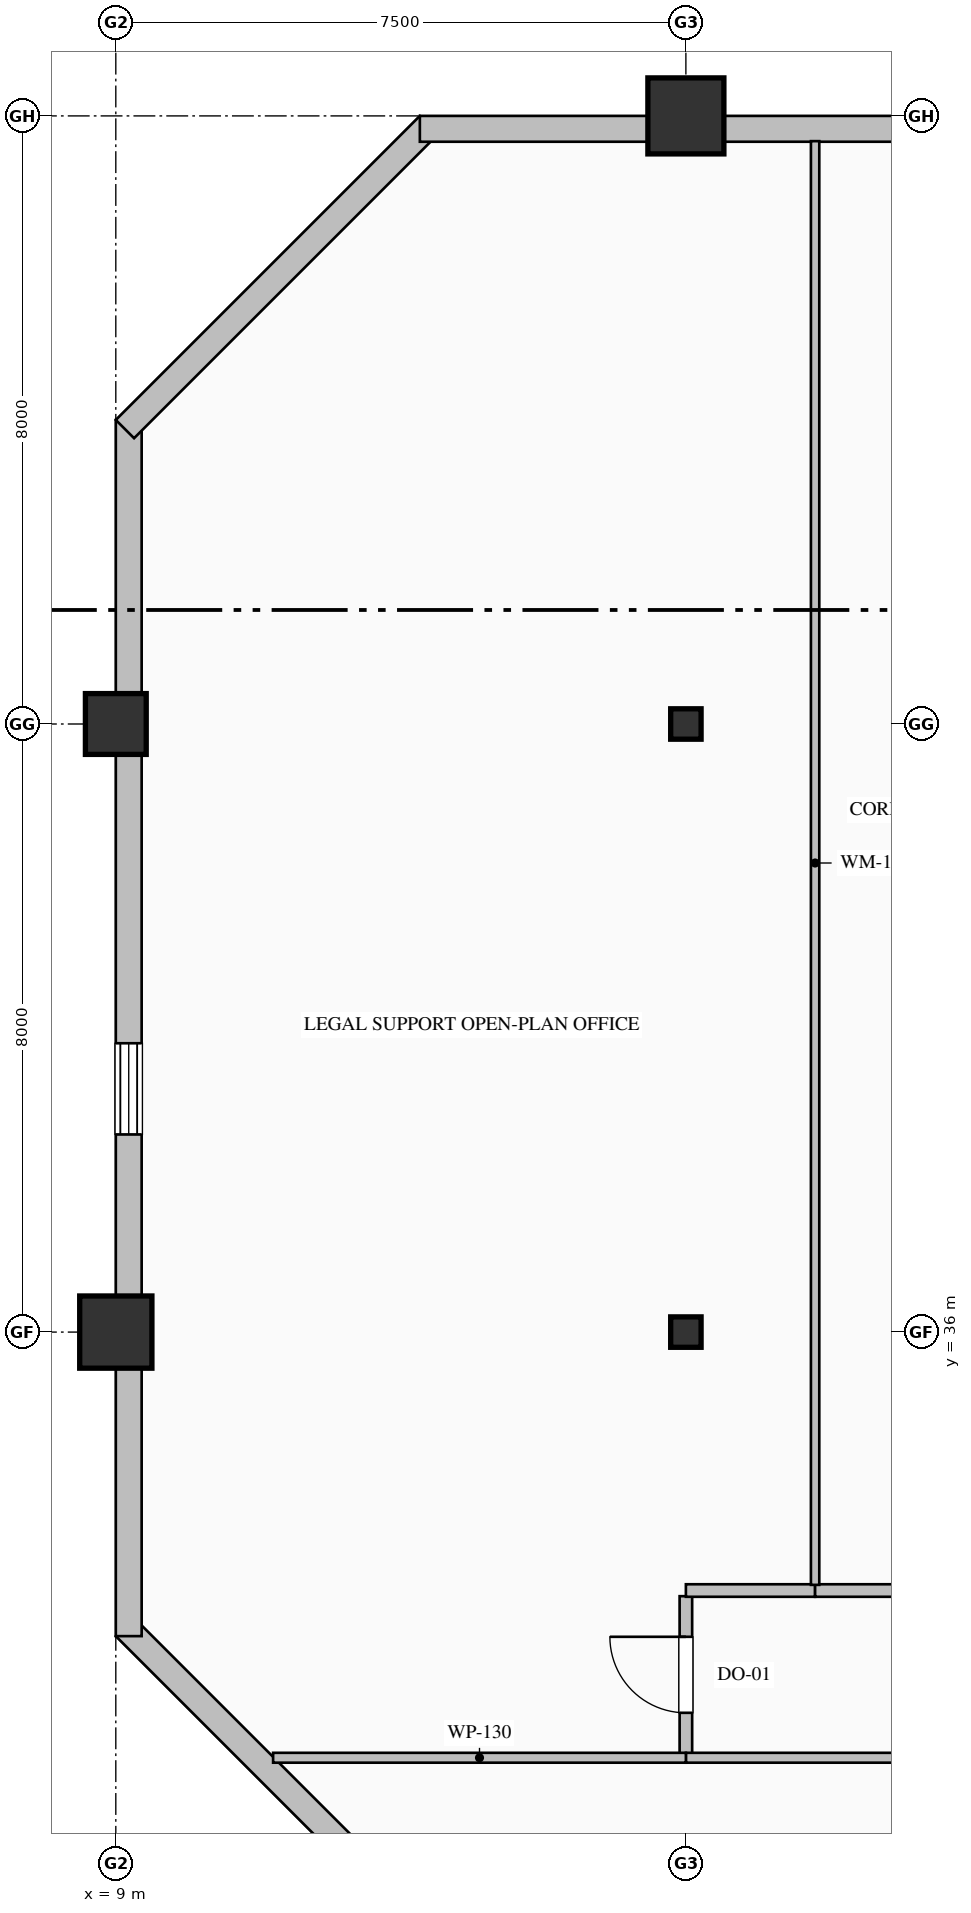
"""IFC4 building model, lengths in metres.
Left out: names, types, materials, properties, quantities, classifications, styles, units other than length and angle.
Written with IfcOpenShell. Run it as: python <this file> out.ifc"""

import sys

from ifc_helpers import new_model, si_unit, direction, frame, frame_2d, origin, origin_2d, place, context, subcontext, project, spatial, rectangle, hollow_rectangle, hollow_circle, i_section, extrude, element, fill, save


model = new_model("IFC4")
c1 = context("Model", 3, precision=1e-05, world=origin(), true_north=direction((0.0, 1.0)))
c2 = subcontext(c1, "Body", "Model", "MODEL_VIEW")
j1 = project(units=[si_unit("LENGTHUNIT", "METRE"), si_unit("PLANEANGLEUNIT", "RADIAN")], contexts=[c1])
p1 = place(None, origin())
s1 = spatial("IfcSite", under=j1, at=p1, CompositionType="ELEMENT")
p2 = place(p1, origin())
s2 = spatial("IfcBuilding", under=s1, at=p2, CompositionType="ELEMENT")
p3 = place(p2, frame((0.0, 0.0, 277.8)))
s3 = spatial("IfcBuildingStorey", under=s2, at=p3, CompositionType="ELEMENT", Elevation=277.8)
p4 = place(p3, frame((9.0, 36.0, 0.0), z_axis=(0.0, 0.0, 1.0), x_axis=(1.0, 0.0, 0.0)))
e1 = element("IfcColumn", 1, at=p4, inside=s3, PredefinedType="COLUMN", context=c2, shape_type="SweptSolid", body=[
    extrude(hollow_rectangle(XDim=0.95, YDim=0.95, WallThickness=0.036, at=origin_2d()), origin(), (0.0, 0.0, 1.0), 4.0),
])
p5 = place(p3, frame((9.0, 44.0, 0.0), z_axis=(0.0, 0.0, 1.0), x_axis=(1.0, 0.0, 0.0)))
e2 = element("IfcColumn", 2, at=p5, inside=s3, PredefinedType="COLUMN", context=c2, shape_type="SweptSolid", body=[
    extrude(hollow_rectangle(XDim=0.8, YDim=0.8, WallThickness=0.032, at=origin_2d()), origin(), (0.0, 0.0, 1.0), 4.0),
])
for number, where, z_axis, x_axis in (
    (3, (16.5, 36.0, 0.0), (0.0, 0.0, 1.0), (1.0, 0.0, 0.0)),
    (4, (16.5, 44.0, 0.0), (0.0, 0.0, 1.0), (1.0, 0.0, 0.0)),
):
    element("IfcColumn", number, at=place(p3, frame(where, z_axis=z_axis, x_axis=x_axis)), inside=s3, PredefinedType="COLUMN", context=c2, shape_type="SweptSolid", body=[
        extrude(i_section(OverallWidth=0.4, OverallDepth=0.4, WebThickness=0.013, FlangeThickness=0.021, FilletRadius=0.022, at=origin_2d()), origin(), (0.0, 0.0, 1.0), 4.0),
    ])
p6 = place(p3, frame((16.5, 52.0, 0.0), z_axis=(0.0, 0.0, 1.0), x_axis=(1.0, 0.0, 0.0)))
e5 = element("IfcColumn", 5, at=p6, inside=s3, PredefinedType="COLUMN", context=c2, shape_type="SweptSolid", body=[
    extrude(hollow_circle(Radius=0.5, WallThickness=0.036, at=origin_2d()), origin(), (0.0, 0.0, 1.0), 4.0),
])
p7 = place(p3, frame((13.12, 28.12, 0.0), z_axis=(0.0, 0.0, 1.0), x_axis=(-0.707106781187, 0.707106781187, 0.0)))
e6 = element("IfcWall", 6, at=p7, inside=s3, PredefinedType="SOLIDWALL", context=c2, shape_type="SweptSolid", body=[
    extrude(rectangle(XDim=5.657, YDim=0.34, at=frame_2d((2.828, 0.0))), origin(), (0.0, 0.0, 1.0), 3.65),
])
p8 = place(p3, frame((9.17, 32.0, 0.0), z_axis=(0.0, 0.0, 1.0), x_axis=(0.0, 1.0, 0.0)))
e7 = element("IfcWall", 7, at=p8, inside=s3, PredefinedType="SOLIDWALL", context=c2, shape_type="SweptSolid", body=[
    extrude(rectangle(XDim=16.0, YDim=0.34, at=frame_2d((8.0, 0.0))), origin(), (0.0, 0.0, 1.0), 3.2),
])
p9 = place(p8, frame((6.6, 0.0, 0.7)))
e8 = element("IfcOpeningElement", 8, at=p9, cuts=e7, PredefinedType="OPENING", context=c2, shape_type="SweptSolid", body=[
    extrude(rectangle(XDim=1.2, YDim=1.85, at=frame_2d((0.6, 0.925))), frame((0.0, 0.18, 0.0), z_axis=(0.0, -1.0, 0.0), x_axis=(1.0, 0.0, 0.0)), (0.0, 0.0, 1.0), 0.36),
])
p10 = place(p3, frame((9.12, 47.88, 0.0), z_axis=(0.0, 0.0, 1.0), x_axis=(0.707106781187, 0.707106781187, 0.0)))
e9 = element("IfcWall", 9, at=p10, inside=s3, PredefinedType="SOLIDWALL", context=c2, shape_type="SweptSolid", body=[
    extrude(rectangle(XDim=5.657, YDim=0.34, at=frame_2d((2.828, 0.0))), origin(), (0.0, 0.0, 1.0), 3.65),
])
p11 = place(p3, frame((13.0, 51.83, 0.0), z_axis=(0.0, 0.0, 1.0), x_axis=(1.0, 0.0, 0.0)))
e10 = element("IfcWall", 10, at=p11, inside=s3, PredefinedType="SOLIDWALL", context=c2, shape_type="SweptSolid", body=[
    extrude(rectangle(XDim=27.52, YDim=0.34, at=frame_2d((13.76, 0.0))), origin(), (0.0, 0.0, 1.0), 3.2),
])
p12 = place(p11, frame((6.525, 0.0, 0.9)))
e11 = element("IfcOpeningElement", 11, at=p12, cuts=e10, PredefinedType="OPENING", context=c2, shape_type="SweptSolid", body=[
    extrude(rectangle(XDim=1.35, YDim=1.85, at=frame_2d((0.675, 0.925))), frame((0.0, 0.18, 0.0), z_axis=(0.0, -1.0, 0.0), x_axis=(1.0, 0.0, 0.0)), (0.0, 0.0, 1.0), 0.36),
])
p13 = place(p11, frame((17.325, 0.0, 0.9)))
e12 = element("IfcOpeningElement", 12, at=p13, cuts=e10, PredefinedType="OPENING", context=c2, shape_type="SweptSolid", body=[
    extrude(rectangle(XDim=1.35, YDim=1.85, at=frame_2d((0.675, 0.925))), frame((0.0, 0.18, 0.0), z_axis=(0.0, -1.0, 0.0), x_axis=(1.0, 0.0, 0.0)), (0.0, 0.0, 1.0), 0.36),
])
p14 = place(p3, frame((16.5, 30.457, 0.0), z_axis=(0.0, 0.0, 1.0), x_axis=(0.0, 1.0, 0.0)))
e13 = element("IfcWall", 13, at=p14, inside=s3, PredefinedType="PARTITIONING", context=c2, shape_type="SweptSolid", body=[
    extrude(rectangle(XDim=2.068, YDim=0.165, at=frame_2d((1.034, 0.0))), origin(), (0.0, 0.0, 1.0), 3.054),
])
p15 = place(p14, frame((0.534, 0.0, 0.0)))
e14 = element("IfcOpeningElement", 14, at=p15, cuts=e13, PredefinedType="OPENING", context=c2, shape_type="SweptSolid", body=[
    extrude(rectangle(XDim=1.0, YDim=2.15, at=frame_2d((0.5, 1.075))), frame((0.0, 0.093, 0.0), z_axis=(0.0, -1.0, 0.0), x_axis=(1.0, 0.0, 0.0)), (0.0, 0.0, 1.0), 0.185),
])
p16 = place(p3, frame((16.5, 32.6, 0.0), z_axis=(0.0, 0.0, 1.0), x_axis=(1.0, 0.0, 0.0)))
e15 = element("IfcWall", 15, at=p16, inside=s3, PredefinedType="PARTITIONING", context=c2, shape_type="SweptSolid", body=[
    extrude(rectangle(XDim=1.7, YDim=0.165, at=frame_2d((0.85, 0.0))), origin(), (0.0, 0.0, 1.0), 3.65),
])
p17 = place(p3, frame((18.2, 32.6, 0.0), z_axis=(0.0, 0.0, 1.0), x_axis=(1.0, 0.0, 0.0)))
e16 = element("IfcWall", 16, at=p17, inside=s3, PredefinedType="PARTITIONING", context=c2, shape_type="SweptSolid", body=[
    extrude(rectangle(XDim=4.6, YDim=0.165, at=frame_2d((2.3, 0.0))), origin(), (0.0, 0.0, 1.0), 3.65),
])
p18 = place(p17, frame((1.85, 0.0, 0.0)))
e17 = element("IfcOpeningElement", 17, at=p18, cuts=e16, PredefinedType="OPENING", context=c2, shape_type="SweptSolid", body=[
    extrude(rectangle(XDim=0.9, YDim=2.15, at=frame_2d((0.45, 1.075))), frame((0.0, 0.093, 0.0), z_axis=(0.0, -1.0, 0.0), x_axis=(1.0, 0.0, 0.0)), (0.0, 0.0, 1.0), 0.185),
])
p19 = place(p3, frame((37.8, 30.4, 0.0), z_axis=(0.0, 0.0, 1.0), x_axis=(-1.0, 0.0, 0.0)))
e18 = element("IfcWall", 18, at=p19, inside=s3, PredefinedType="PARTITIONING", context=c2, shape_type="SweptSolid", body=[
    extrude(rectangle(XDim=21.3, YDim=0.13, at=frame_2d((10.65, 0.0))), origin(), (0.0, 0.0, 1.0), 3.65),
])
p20 = place(p19, frame((10.15, 0.0, 0.0)))
e19 = element("IfcOpeningElement", 19, at=p20, cuts=e18, PredefinedType="OPENING", context=c2, shape_type="SweptSolid", body=[
    extrude(rectangle(XDim=1.0, YDim=2.15, at=frame_2d((0.5, 1.075))), frame((0.0, 0.075, 0.0), z_axis=(0.0, -1.0, 0.0), x_axis=(1.0, 0.0, 0.0)), (0.0, 0.0, 1.0), 0.15),
])
p21 = place(p3, frame((18.2, 51.668, 0.0), z_axis=(0.0, 0.0, 1.0), x_axis=(0.0, -1.0, 0.0)))
e20 = element("IfcWall", 20, at=p21, inside=s3, PredefinedType="MOVABLE", context=c2, shape_type="SweptSolid", body=[
    extrude(rectangle(XDim=18.993, YDim=0.11, at=frame_2d((9.497, 0.0))), origin(), (0.0, 0.0, 1.0), 3.65),
])
p22 = place(p3, frame((16.5, 30.4, 0.0), z_axis=(0.0, 0.0, 1.0), x_axis=(-1.0, 0.0, 0.0)))
e21 = element("IfcWall", 21, at=p22, inside=s3, PredefinedType="PARTITIONING", context=c2, shape_type="SweptSolid", body=[
    extrude(rectangle(XDim=5.43, YDim=0.13, at=frame_2d((2.715, 0.0))), origin(), (0.0, 0.0, 1.0), 3.65),
])
p23 = place(p9, origin())
e22 = element("IfcWindow", 22, at=p23, inside=s3, PartitioningType="DOUBLE_PANEL_VERTICAL", PredefinedType="WINDOW", context=c2, shape_type="SweptSolid", body=[
    extrude(rectangle(XDim=1.2, YDim=1.85, at=frame_2d((0.6, 0.925))), frame((0.0, 0.15, 0.0), z_axis=(0.0, -1.0, 0.0), x_axis=(1.0, 0.0, 0.0)), (0.0, 0.0, 1.0), 0.06),
])
fill(e8, e22)
p24 = place(p15, origin())
e23 = element("IfcDoor", 23, at=p24, inside=s3, OperationType="SINGLE_SWING_RIGHT", PredefinedType="DOOR", context=c2, shape_type="SweptSolid", body=[
    extrude(rectangle(XDim=1.0, YDim=2.15, at=frame_2d((0.5, 1.075))), frame((0.0, 0.025, 0.0), z_axis=(0.0, -1.0, 0.0), x_axis=(1.0, 0.0, 0.0)), (0.0, 0.0, 1.0), 0.05),
])
fill(e14, e23)
save(model, sys.argv[1])
